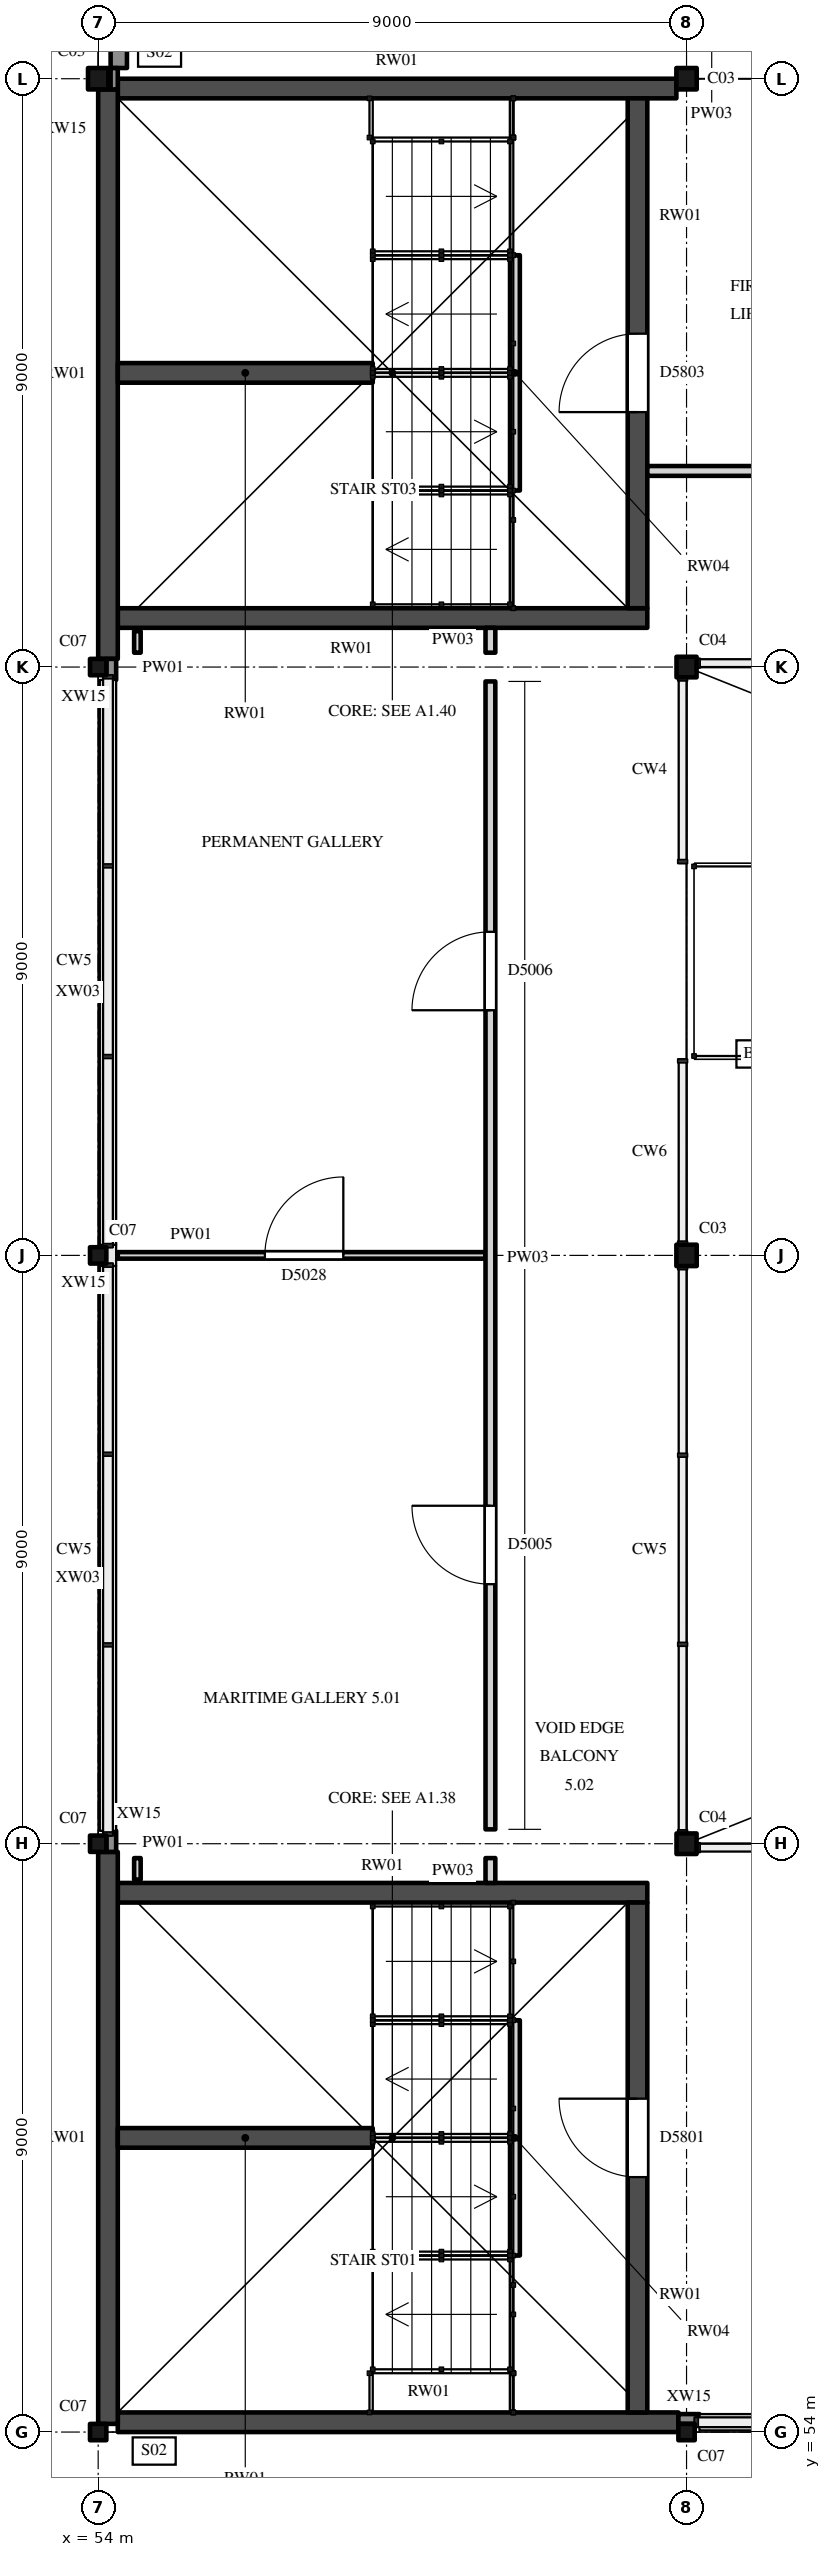
"""IFC4 building model, lengths in metres.
Left out: names, types, materials, properties, quantities, classifications, styles, units other than length and angle.
Written with IfcOpenShell. Run it as: python <this file> out.ifc"""

import sys

from ifc_helpers import new_model, si_unit, direction, frame, frame_2d, origin, origin_2d, place, context, subcontext, project, spatial, rectangle, hollow_rectangle, i_section, extrude, element, fill, save


model = new_model("IFC4")
c1 = context("Model", 3, precision=1e-05, world=origin(), true_north=direction((0.0, 1.0)))
c2 = subcontext(c1, "Body", "Model", "MODEL_VIEW")
j1 = project(units=[si_unit("LENGTHUNIT", "METRE"), si_unit("PLANEANGLEUNIT", "RADIAN")], contexts=[c1])
p1 = place(None, origin())
s1 = spatial("IfcSite", under=j1, at=p1, CompositionType="ELEMENT")
p2 = place(p1, origin())
s2 = spatial("IfcBuilding", under=s1, at=p2, CompositionType="ELEMENT")
p3 = place(p2, frame((0.0, 0.0, 31.0)))
s3 = spatial("IfcBuildingStorey", under=s2, at=p3, CompositionType="ELEMENT", Elevation=31.0)
for number, where, z_axis, x_axis in (
    (1, (54.0, 54.0, 0.0), (0.0, 0.0, 1.0), (1.0, 0.0, 0.0)),
    (2, (63.0, 54.0, 0.0), (0.0, 0.0, 1.0), (1.0, 0.0, 0.0)),
    (3, (54.0, 63.0, 0.0), (0.0, 0.0, 1.0), (1.0, 0.0, 0.0)),
):
    element("IfcColumn", number, at=place(p3, frame(where, z_axis=z_axis, x_axis=x_axis)), inside=s3, PredefinedType="COLUMN", context=c2, shape_type="SweptSolid", body=[
        extrude(hollow_rectangle(XDim=0.25, YDim=0.25, WallThickness=0.009, InnerFilletRadius=0.013, OuterFilletRadius=0.022, at=origin_2d()), origin(), (0.0, 0.0, 1.0), 5.0),
    ])
p4 = place(p3, frame((63.0, 63.0, 0.0), z_axis=(0.0, 0.0, 1.0), x_axis=(1.0, 0.0, 0.0)))
e4 = element("IfcColumn", 4, at=p4, inside=s3, PredefinedType="COLUMN", context=c2, shape_type="SweptSolid", body=[
    extrude(i_section(OverallWidth=0.307, OverallDepth=0.315, WebThickness=0.012, FlangeThickness=0.019, FilletRadius=0.017, at=origin_2d()), origin(), (0.0, 0.0, 1.0), 5.0),
])
p5 = place(p3, frame((54.0, 72.0, 0.0), z_axis=(0.0, 0.0, 1.0), x_axis=(1.0, 0.0, 0.0)))
e5 = element("IfcColumn", 5, at=p5, inside=s3, PredefinedType="COLUMN", context=c2, shape_type="SweptSolid", body=[
    extrude(hollow_rectangle(XDim=0.25, YDim=0.25, WallThickness=0.009, InnerFilletRadius=0.013, OuterFilletRadius=0.022, at=origin_2d()), origin(), (0.0, 0.0, 1.0), 5.0),
])
p6 = place(p3, frame((63.0, 72.0, 0.0), z_axis=(0.0, 0.0, 1.0), x_axis=(1.0, 0.0, 0.0)))
e6 = element("IfcColumn", 6, at=p6, inside=s3, PredefinedType="COLUMN", context=c2, shape_type="SweptSolid", body=[
    extrude(i_section(OverallWidth=0.311, OverallDepth=0.327, WebThickness=0.016, FlangeThickness=0.025, FilletRadius=0.017, at=origin_2d()), origin(), (0.0, 0.0, 1.0), 5.0),
])
p7 = place(p3, frame((54.0, 81.0, 0.0), z_axis=(0.0, 0.0, 1.0), x_axis=(1.0, 0.0, 0.0)))
e7 = element("IfcColumn", 7, at=p7, inside=s3, PredefinedType="COLUMN", context=c2, shape_type="SweptSolid", body=[
    extrude(hollow_rectangle(XDim=0.25, YDim=0.25, WallThickness=0.009, InnerFilletRadius=0.013, OuterFilletRadius=0.022, at=origin_2d()), origin(), (0.0, 0.0, 1.0), 5.0),
])
p8 = place(p3, frame((63.0, 81.0, 0.0), z_axis=(0.0, 0.0, 1.0), x_axis=(1.0, 0.0, 0.0)))
e8 = element("IfcColumn", 8, at=p8, inside=s3, PredefinedType="COLUMN", context=c2, shape_type="SweptSolid", body=[
    extrude(i_section(OverallWidth=0.307, OverallDepth=0.315, WebThickness=0.012, FlangeThickness=0.019, FilletRadius=0.017, at=origin_2d()), origin(), (0.0, 0.0, 1.0), 5.0),
])
for number, where, z_axis, x_axis in (
    (9, (54.0, 90.0, 0.0), (0.0, 0.0, 1.0), (1.0, 0.0, 0.0)),
    (10, (63.0, 90.0, 0.0), (0.0, 0.0, 1.0), (1.0, 0.0, 0.0)),
):
    element("IfcColumn", number, at=place(p3, frame(where, z_axis=z_axis, x_axis=x_axis)), inside=s3, PredefinedType="COLUMN", context=c2, shape_type="SweptSolid", body=[
        extrude(i_section(OverallWidth=0.311, OverallDepth=0.327, WebThickness=0.016, FlangeThickness=0.025, FilletRadius=0.017, at=origin_2d()), origin(), (0.0, 0.0, 1.0), 5.0),
    ])
p9 = place(p3, frame((54.3, 54.15, 0.0), z_axis=(0.0, 0.0, 1.0), x_axis=(1.0, 0.0, 0.0)))
e11 = element("IfcWall", 11, at=p9, inside=s3, PredefinedType="SHEAR", context=c2, shape_type="SweptSolid", body=[
    extrude(rectangle(XDim=8.575, YDim=0.3, at=frame_2d((4.288, 0.0))), origin(), (0.0, 0.0, 1.0), 5.0),
])
p10 = place(p3, frame((54.3, 62.25, 0.0), z_axis=(0.0, 0.0, 1.0), x_axis=(1.0, 0.0, 0.0)))
e12 = element("IfcWall", 12, at=p10, inside=s3, PredefinedType="SHEAR", context=c2, shape_type="SweptSolid", body=[
    extrude(rectangle(XDim=8.1, YDim=0.3, at=frame_2d((4.05, 0.0))), origin(), (0.0, 0.0, 1.0), 5.0),
])
p11 = place(p3, frame((54.15, 54.125, 0.0), z_axis=(0.0, 0.0, 1.0), x_axis=(0.0, 1.0, 0.0)))
e13 = element("IfcWall", 13, at=p11, inside=s3, PredefinedType="SHEAR", context=c2, shape_type="SweptSolid", body=[
    extrude(rectangle(XDim=8.75, YDim=0.3, at=frame_2d((4.375, 0.0))), origin(), (0.0, 0.0, 1.0), 5.0),
])
p12 = place(p3, frame((62.25, 54.3, 0.0), z_axis=(0.0, 0.0, 1.0), x_axis=(0.0, 1.0, 0.0)))
e14 = element("IfcWall", 14, at=p12, inside=s3, PredefinedType="SHEAR", context=c2, shape_type="SweptSolid", body=[
    extrude(rectangle(XDim=7.8, YDim=0.3, at=frame_2d((3.9, 0.0))), origin(), (0.0, 0.0, 1.0), 5.0),
])
p13 = place(p12, frame((3.6, 0.0, 0.0)))
e15 = element("IfcOpeningElement", 15, at=p13, cuts=e14, PredefinedType="OPENING", context=c2, shape_type="SweptSolid", body=[
    extrude(rectangle(XDim=1.2, YDim=2.1, at=frame_2d((0.6, 1.05))), frame((0.0, 0.16, 0.0), z_axis=(0.0, -1.0, 0.0), x_axis=(1.0, 0.0, 0.0)), (0.0, 0.0, 1.0), 0.32),
])
p14 = place(p3, frame((54.3, 81.75, 0.0), z_axis=(0.0, 0.0, 1.0), x_axis=(1.0, 0.0, 0.0)))
e16 = element("IfcWall", 16, at=p14, inside=s3, PredefinedType="SHEAR", context=c2, shape_type="SweptSolid", body=[
    extrude(rectangle(XDim=8.1, YDim=0.3, at=frame_2d((4.05, 0.0))), origin(), (0.0, 0.0, 1.0), 5.0),
])
p15 = place(p3, frame((54.3, 89.85, 0.0), z_axis=(0.0, 0.0, 1.0), x_axis=(1.0, 0.0, 0.0)))
e17 = element("IfcWall", 17, at=p15, inside=s3, PredefinedType="SHEAR", context=c2, shape_type="SweptSolid", body=[
    extrude(rectangle(XDim=8.544, YDim=0.3, at=frame_2d((4.272, 0.0))), origin(), (0.0, 0.0, 1.0), 5.0),
])
p16 = place(p3, frame((54.15, 81.125, 0.0), z_axis=(0.0, 0.0, 1.0), x_axis=(0.0, 1.0, 0.0)))
e18 = element("IfcWall", 18, at=p16, inside=s3, PredefinedType="SHEAR", context=c2, shape_type="SweptSolid", body=[
    extrude(rectangle(XDim=8.711, YDim=0.3, at=frame_2d((4.356, 0.0))), origin(), (0.0, 0.0, 1.0), 5.0),
])
p17 = place(p3, frame((62.25, 81.9, 0.0), z_axis=(0.0, 0.0, 1.0), x_axis=(0.0, 1.0, 0.0)))
e19 = element("IfcWall", 19, at=p17, inside=s3, PredefinedType="SHEAR", context=c2, shape_type="SweptSolid", body=[
    extrude(rectangle(XDim=7.8, YDim=0.3, at=frame_2d((3.9, 0.0))), origin(), (0.0, 0.0, 1.0), 5.0),
])
p18 = place(p17, frame((3.0, 0.0, 0.0)))
e20 = element("IfcOpeningElement", 20, at=p18, cuts=e19, PredefinedType="OPENING", context=c2, shape_type="SweptSolid", body=[
    extrude(rectangle(XDim=1.2, YDim=2.1, at=frame_2d((0.6, 1.05))), frame((0.0, 0.16, 0.0), z_axis=(0.0, -1.0, 0.0), x_axis=(1.0, 0.0, 0.0)), (0.0, 0.0, 1.0), 0.32),
])
p19 = place(p3, frame((58.2, 58.5, 0.0), z_axis=(0.0, 0.0, 1.0), x_axis=(-1.0, 0.0, 0.0)))
e21 = element("IfcWall", 21, at=p19, inside=s3, PredefinedType="SHEAR", context=c2, shape_type="SweptSolid", body=[
    extrude(rectangle(XDim=3.9, YDim=0.3, at=frame_2d((1.95, 0.0))), origin(), (0.0, 0.0, 1.0), 5.0),
])
p20 = place(p3, frame((60.375, 56.7, 0.0), z_axis=(0.0, 0.0, 1.0), x_axis=(0.0, 1.0, 0.0)))
e22 = element("IfcWall", 22, at=p20, inside=s3, PredefinedType="STANDARD", context=c2, shape_type="SweptSolid", body=[
    extrude(rectangle(XDim=3.6, YDim=0.15, at=frame_2d((1.8, 0.0))), origin(), (0.0, 0.0, 1.0), 2.3),
])
p21 = place(p3, frame((58.2, 85.5, 0.0), z_axis=(0.0, 0.0, 1.0), x_axis=(-1.0, 0.0, 0.0)))
e23 = element("IfcWall", 23, at=p21, inside=s3, PredefinedType="SHEAR", context=c2, shape_type="SweptSolid", body=[
    extrude(rectangle(XDim=3.9, YDim=0.3, at=frame_2d((1.95, 0.0))), origin(), (0.0, 0.0, 1.0), 5.0),
])
p22 = place(p3, frame((60.375, 83.7, 0.0), z_axis=(0.0, 0.0, 1.0), x_axis=(0.0, 1.0, 0.0)))
e24 = element("IfcWall", 24, at=p22, inside=s3, PredefinedType="STANDARD", context=c2, shape_type="SweptSolid", body=[
    extrude(rectangle(XDim=3.6, YDim=0.15, at=frame_2d((1.8, 0.0))), origin(), (0.0, 0.0, 1.0), 2.3),
])
for number, where, z_axis, x_axis in (
    (25, (63.197, 54.15, 0.0), (0.0, 0.0, 1.0), (1.0, 0.0, 0.0)),
    (26, (54.15, 63.197, 0.0), (0.0, 0.0, 1.0), (0.0, 1.0, 0.0)),
    (27, (54.15, 72.161, 0.0), (0.0, 0.0, 1.0), (0.0, 1.0, 0.0)),
):
    element("IfcWall", number, at=place(p3, frame(where, z_axis=z_axis, x_axis=x_axis)), inside=s3, PredefinedType="SOLIDWALL", context=c2, shape_type="SweptSolid", body=[
        extrude(rectangle(XDim=8.642, YDim=0.25, at=frame_2d((4.321, 0.0))), origin(), (0.0, 0.0, 1.0), 1.1),
    ])
p23 = place(p3, frame((54.315, 90.164, 0.0), z_axis=(0.0, 0.0, 1.0), x_axis=(0.0, 1.0, 0.0)))
e28 = element("IfcWall", 28, at=p23, inside=s3, PredefinedType="SOLIDWALL", context=c2, shape_type="SweptSolid", body=[
    extrude(rectangle(XDim=8.676, YDim=0.25, at=frame_2d((4.338, 0.0))), origin(), (0.0, 0.0, 1.0), 4.504),
])
p24 = place(p23, frame((0.586, 0.0, 1.6)))
e29 = element("IfcOpeningElement", 29, at=p24, cuts=e28, PredefinedType="OPENING", context=c2, shape_type="SweptSolid", body=[
    extrude(rectangle(XDim=0.6, YDim=1.2, at=frame_2d((0.3, 0.6))), frame((0.0, 0.135, 0.0), z_axis=(0.0, -1.0, 0.0), x_axis=(1.0, 0.0, 0.0)), (0.0, 0.0, 1.0), 0.27),
])
p25 = place(p23, frame((2.992, 0.0, 1.6)))
e30 = element("IfcOpeningElement", 30, at=p25, cuts=e28, PredefinedType="OPENING", context=c2, shape_type="SweptSolid", body=[
    extrude(rectangle(XDim=2.7, YDim=1.2, at=frame_2d((1.35, 0.6))), frame((0.0, 0.135, 0.0), z_axis=(0.0, -1.0, 0.0), x_axis=(1.0, 0.0, 0.0)), (0.0, 0.0, 1.0), 0.27),
])
p26 = place(p23, frame((7.486, 0.0, 1.6)))
e31 = element("IfcOpeningElement", 31, at=p26, cuts=e28, PredefinedType="OPENING", context=c2, shape_type="SweptSolid", body=[
    extrude(rectangle(XDim=0.6, YDim=1.2, at=frame_2d((0.3, 0.6))), frame((0.0, 0.135, 0.0), z_axis=(0.0, -1.0, 0.0), x_axis=(1.0, 0.0, 0.0)), (0.0, 0.0, 1.0), 0.27),
])
for number, where, z_axis, x_axis in (
    (32, (62.875, 54.2, 0.0), (0.0, 0.0, 1.0), (1.0, 0.0, 0.0)),
    (33, (54.2, 62.875, 0.0), (0.0, 0.0, 1.0), (0.0, 1.0, 0.0)),
):
    element("IfcWall", number, at=place(p3, frame(where, z_axis=z_axis, x_axis=x_axis)), inside=s3, PredefinedType="SOLIDWALL", context=c2, shape_type="SweptSolid", body=[
        extrude(rectangle(XDim=0.322, YDim=0.15, at=frame_2d((0.161, 0.0))), origin(), (0.0, 0.0, 1.0), 5.0),
    ])
p27 = place(p3, frame((54.2, 71.839, 0.0), z_axis=(0.0, 0.0, 1.0), x_axis=(0.0, 1.0, 0.0)))
e34 = element("IfcWall", 34, at=p27, inside=s3, PredefinedType="SOLIDWALL", context=c2, shape_type="SweptSolid", body=[
    extrude(rectangle(XDim=0.322, YDim=0.15, at=frame_2d((0.161, 0.0))), origin(), (0.0, 0.0, 1.0), 1.1),
])
p28 = place(p3, frame((54.2, 80.803, 0.0), z_axis=(0.0, 0.0, 1.0), x_axis=(0.0, 1.0, 0.0)))
e35 = element("IfcWall", 35, at=p28, inside=s3, PredefinedType="SOLIDWALL", context=c2, shape_type="SweptSolid", body=[
    extrude(rectangle(XDim=0.322, YDim=0.15, at=frame_2d((0.161, 0.0))), origin(), (0.0, 0.0, 1.0), 5.0),
])
p29 = place(p3, frame((54.245, 89.836, 0.0), z_axis=(0.0, 0.0, 1.0), x_axis=(0.0, 1.0, 0.0)))
e36 = element("IfcWall", 36, at=p29, inside=s3, PredefinedType="SOLIDWALL", context=c2, shape_type="SweptSolid", body=[
    extrude(rectangle(XDim=0.327, YDim=0.11, at=frame_2d((0.164, 0.0))), origin(), (0.0, 0.0, 1.0), 5.0),
])
p30 = place(p3, frame((54.3, 72.0, 0.0), z_axis=(0.0, 0.0, 1.0), x_axis=(1.0, 0.0, 0.0)))
e37 = element("IfcWall", 37, at=p30, inside=s3, PredefinedType="PARTITIONING", context=c2, shape_type="SweptSolid", body=[
    extrude(rectangle(XDim=5.625, YDim=0.1, at=frame_2d((2.812, 0.0))), origin(), (0.0, 0.0, 1.0), 4.518),
])
p31 = place(p30, frame((2.25, 0.0, 0.0)))
e38 = element("IfcOpeningElement", 38, at=p31, cuts=e37, PredefinedType="OPENING", context=c2, shape_type="SweptSolid", body=[
    extrude(rectangle(XDim=1.2, YDim=2.4, at=frame_2d((0.6, 1.2))), frame((0.0, 0.06, 0.0), z_axis=(0.0, -1.0, 0.0), x_axis=(1.0, 0.0, 0.0)), (0.0, 0.0, 1.0), 0.12),
])
p32 = place(p3, frame((62.4, 84.0, 0.0), z_axis=(0.0, 0.0, 1.0), x_axis=(1.0, 0.0, 0.0)))
e39 = element("IfcWall", 39, at=p32, inside=s3, PredefinedType="PARTITIONING", context=c2, shape_type="SweptSolid", body=[
    extrude(rectangle(XDim=3.875, YDim=0.15, at=frame_2d((1.938, 0.0))), origin(), (0.0, 0.0, 1.0), 4.521),
])
for number, where, z_axis, x_axis in (
    (40, (54.6, 62.45, 0.0), (0.0, 0.0, 1.0), (0.0, 1.0, 0.0)),
    (41, (54.6, 81.22, 0.0), (0.0, 0.0, 1.0), (0.0, 1.0, 0.0)),
):
    element("IfcWall", number, at=place(p3, frame(where, z_axis=z_axis, x_axis=x_axis)), inside=s3, PredefinedType="PARTITIONING", context=c2, shape_type="SweptSolid", body=[
        extrude(rectangle(XDim=0.33, YDim=0.1, at=frame_2d((0.165, 0.0))), origin(), (0.0, 0.0, 1.0), 4.825),
    ])
p33 = place(p3, frame((60.0, 62.4, 0.0), z_axis=(0.0, 0.0, 1.0), x_axis=(0.0, 1.0, 0.0)))
e42 = element("IfcWall", 42, at=p33, inside=s3, PredefinedType="PARTITIONING", context=c2, shape_type="SweptSolid", body=[
    extrude(rectangle(XDim=0.38, YDim=0.15, at=frame_2d((0.19, 0.0))), origin(), (0.0, 0.0, 1.0), 4.825),
])
p34 = place(p3, frame((60.0, 63.22, 0.0), z_axis=(0.0, 0.0, 1.0), x_axis=(0.0, 1.0, 0.0)))
e43 = element("IfcWall", 43, at=p34, inside=s3, PredefinedType="PARTITIONING", context=c2, shape_type="SweptSolid", body=[
    extrude(rectangle(XDim=17.56, YDim=0.15, at=frame_2d((8.78, 0.0))), origin(), (0.0, 0.0, 1.0), 4.825),
])
p35 = place(p34, frame((3.75, 0.0, 0.0)))
e44 = element("IfcOpeningElement", 44, at=p35, cuts=e43, PredefinedType="OPENING", context=c2, shape_type="SweptSolid", body=[
    extrude(rectangle(XDim=1.2, YDim=2.4, at=frame_2d((0.6, 1.2))), frame((0.0, 0.085, 0.0), z_axis=(0.0, -1.0, 0.0), x_axis=(1.0, 0.0, 0.0)), (0.0, 0.0, 1.0), 0.17),
])
p36 = place(p34, frame((12.53, 0.0, 0.0)))
e45 = element("IfcOpeningElement", 45, at=p36, cuts=e43, PredefinedType="OPENING", context=c2, shape_type="SweptSolid", body=[
    extrude(rectangle(XDim=1.2, YDim=2.4, at=frame_2d((0.6, 1.2))), frame((0.0, 0.085, 0.0), z_axis=(0.0, -1.0, 0.0), x_axis=(1.0, 0.0, 0.0)), (0.0, 0.0, 1.0), 0.17),
])
p37 = place(p3, frame((60.0, 81.22, 0.0), z_axis=(0.0, 0.0, 1.0), x_axis=(0.0, 1.0, 0.0)))
e46 = element("IfcWall", 46, at=p37, inside=s3, PredefinedType="PARTITIONING", context=c2, shape_type="SweptSolid", body=[
    extrude(rectangle(XDim=0.38, YDim=0.15, at=frame_2d((0.19, 0.0))), origin(), (0.0, 0.0, 1.0), 4.825),
])
p38 = place(p13, origin())
e47 = element("IfcDoor", 47, at=p38, inside=s3, OperationType="SINGLE_SWING_LEFT", PredefinedType="DOOR", context=c2, shape_type="SweptSolid", body=[
    extrude(rectangle(XDim=1.2, YDim=2.1, at=frame_2d((0.6, 1.05))), frame((0.0, 0.025, 0.0), z_axis=(0.0, -1.0, 0.0), x_axis=(1.0, 0.0, 0.0)), (0.0, 0.0, 1.0), 0.05),
])
fill(e15, e47)
p39 = place(p18, origin())
e48 = element("IfcDoor", 48, at=p39, inside=s3, OperationType="SINGLE_SWING_RIGHT", PredefinedType="DOOR", context=c2, shape_type="SweptSolid", body=[
    extrude(rectangle(XDim=1.2, YDim=2.1, at=frame_2d((0.6, 1.05))), frame((0.0, 0.025, 0.0), z_axis=(0.0, -1.0, 0.0), x_axis=(1.0, 0.0, 0.0)), (0.0, 0.0, 1.0), 0.05),
])
fill(e20, e48)
p40 = place(p35, origin())
e49 = element("IfcDoor", 49, at=p40, inside=s3, OperationType="SINGLE_SWING_LEFT", PredefinedType="DOOR", context=c2, shape_type="SweptSolid", body=[
    extrude(rectangle(XDim=1.2, YDim=2.4, at=frame_2d((0.6, 1.2))), frame((0.0, 0.025, 0.0), z_axis=(0.0, -1.0, 0.0), x_axis=(1.0, 0.0, 0.0)), (0.0, 0.0, 1.0), 0.05),
])
fill(e44, e49)
p41 = place(p36, origin())
e50 = element("IfcDoor", 50, at=p41, inside=s3, OperationType="SINGLE_SWING_RIGHT", PredefinedType="DOOR", context=c2, shape_type="SweptSolid", body=[
    extrude(rectangle(XDim=1.2, YDim=2.4, at=frame_2d((0.6, 1.2))), frame((0.0, 0.025, 0.0), z_axis=(0.0, -1.0, 0.0), x_axis=(1.0, 0.0, 0.0)), (0.0, 0.0, 1.0), 0.05),
])
fill(e45, e50)
p42 = place(p31, origin())
e51 = element("IfcDoor", 51, at=p42, inside=s3, OperationType="SINGLE_SWING_LEFT", PredefinedType="DOOR", context=c2, shape_type="SweptSolid", body=[
    extrude(rectangle(XDim=1.2, YDim=2.4, at=frame_2d((0.6, 1.2))), frame((0.0, 0.025, 0.0), z_axis=(0.0, -1.0, 0.0), x_axis=(1.0, 0.0, 0.0)), (0.0, 0.0, 1.0), 0.05),
])
fill(e38, e51)
save(model, sys.argv[1])
